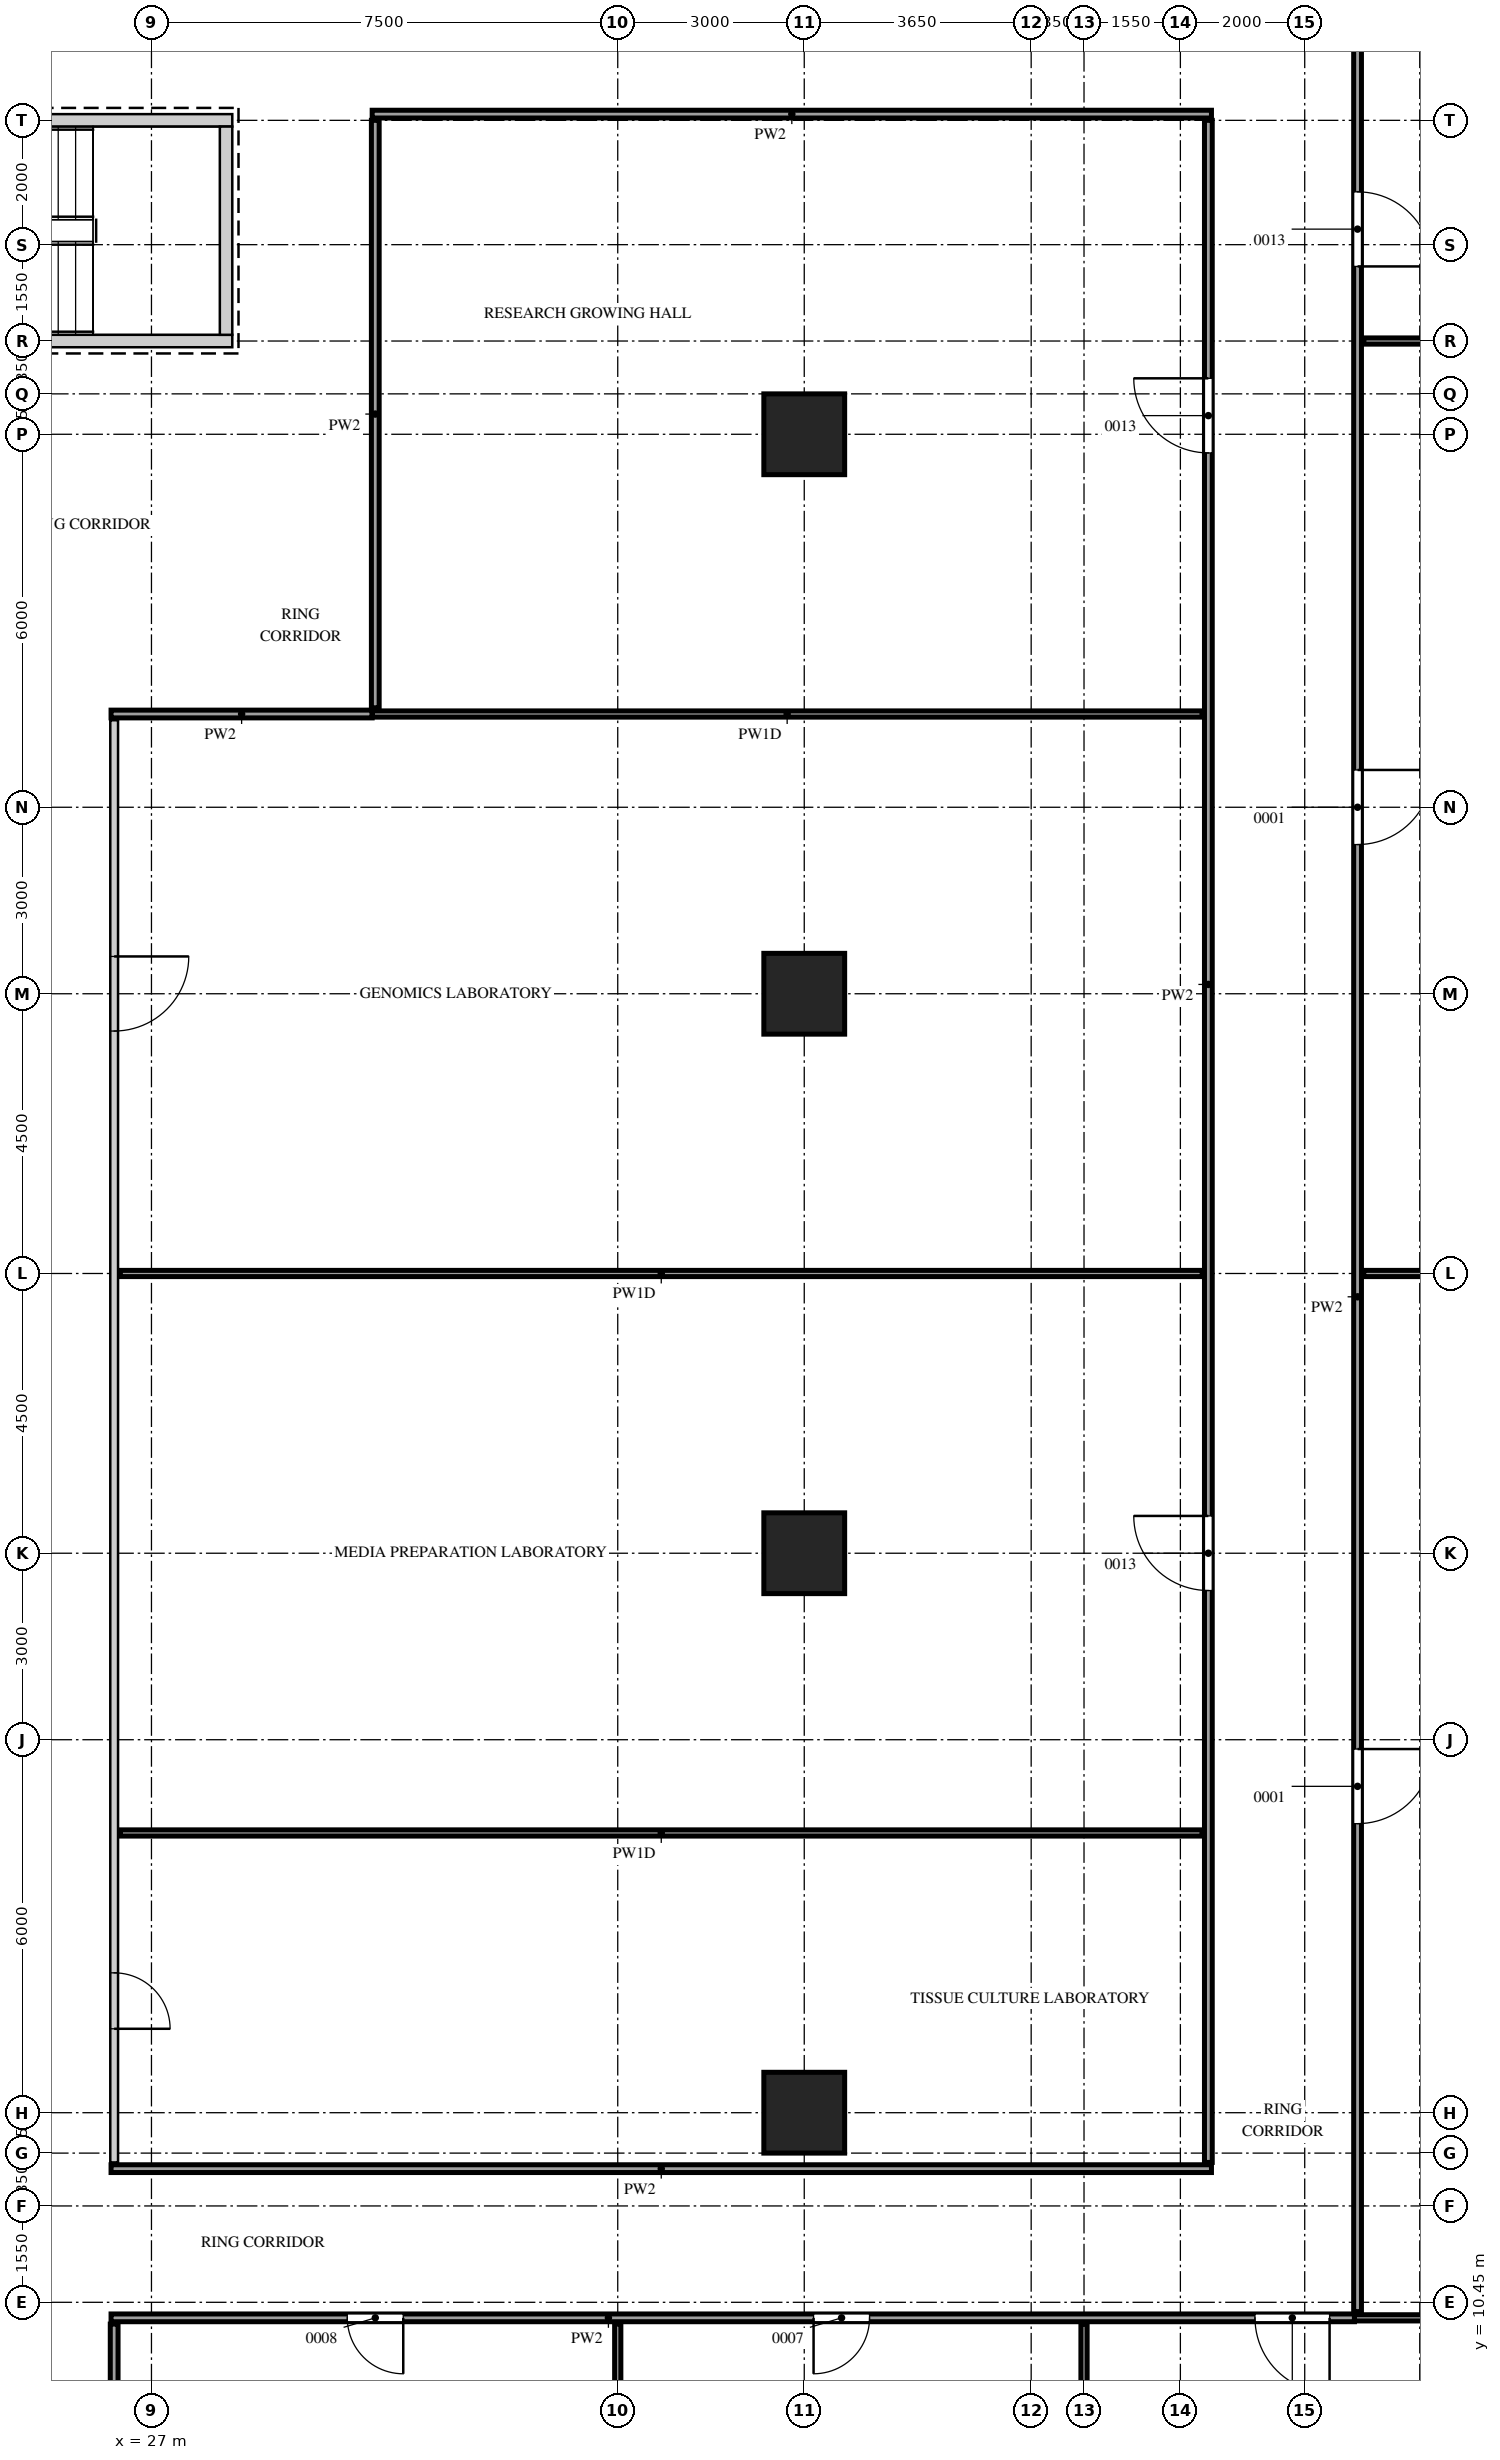
"""IFC4 building model, lengths in metres.
Left out: names, types, materials, properties, quantities, classifications, styles, units other than length and angle.
Written with IfcOpenShell. Run it as: python <this file> out.ifc"""

import sys

from ifc_helpers import new_model, si_unit, direction, frame, frame_2d, origin, origin_2d, place, context, subcontext, project, spatial, rectangle, extrude, source, transform, mapped, element, fill, save


model = new_model("IFC4")
c1 = context("Model", 3, precision=1e-05, world=origin(), true_north=direction((0.0, 1.0)))
c2 = subcontext(c1, "Body", "Model", "MODEL_VIEW")
j1 = project(units=[si_unit("LENGTHUNIT", "METRE"), si_unit("PLANEANGLEUNIT", "RADIAN")], contexts=[c1])
p1 = place(None, origin())
s1 = spatial("IfcSite", under=j1, at=p1, CompositionType="ELEMENT")
p2 = place(p1, origin())
s2 = spatial("IfcBuilding", under=s1, at=p2, CompositionType="ELEMENT")
p3 = place(p2, frame((0.0, 0.0, 101.5)))
s3 = spatial("IfcBuildingStorey", under=s2, at=p3, CompositionType="ELEMENT", Elevation=101.5)
m1 = source(origin(), c2, "Body", "SweptSolid", [
    extrude(rectangle(XDim=7.1, YDim=0.2, at=frame_2d((3.55, 0.0))), origin(), (0.0, 0.0, 1.0), 4.1),
])
p4 = place(p3, frame((21.2, 45.55, 0.0), z_axis=(0.0, 0.0, 1.0), x_axis=(1.0, 0.0, 0.0)))
e1 = element("IfcWall", 1, at=p4, inside=s3, PredefinedType="SHEAR", context=c2, shape_type="MappedRepresentation", body=[
    mapped(m1, transform((0.0, 0.0, 0.0))),
])
m2 = source(origin(), c2, "Body", "SweptSolid", [
    extrude(rectangle(XDim=1.2, YDim=2.1, at=frame_2d((0.6, 1.05))), frame((0.0, 0.11, 0.0), z_axis=(0.0, -1.0, 0.0), x_axis=(1.0, 0.0, 0.0)), (0.0, 0.0, 1.0), 0.22),
])
p5 = place(p4, frame((0.15, 0.0, 0.0)))
e2 = element("IfcOpeningElement", 2, at=p5, cuts=e1, PredefinedType="OPENING", context=c2, shape_type="MappedRepresentation", body=[
    mapped(m2, transform((0.0, 0.0, 0.0))),
])
p6 = place(p3, frame((21.2, 42.0, 0.0), z_axis=(0.0, 0.0, 1.0), x_axis=(1.0, 0.0, 0.0)))
e3 = element("IfcWall", 3, at=p6, inside=s3, PredefinedType="SHEAR", context=c2, shape_type="MappedRepresentation", body=[
    mapped(m1, transform((0.0, 0.0, 0.0))),
])
m3 = source(origin(), c2, "Body", "SweptSolid", [
    extrude(rectangle(XDim=3.35, YDim=0.2, at=frame_2d((1.675, 0.0))), origin(), (0.0, 0.0, 1.0), 4.1),
])
p7 = place(p3, frame((28.2, 42.1, 0.0), z_axis=(0.0, 0.0, 1.0), x_axis=(0.0, 1.0, 0.0)))
e4 = element("IfcWall", 4, at=p7, inside=s3, PredefinedType="SHEAR", context=c2, shape_type="MappedRepresentation", body=[
    mapped(m3, transform((0.0, 0.0, 0.0))),
])
m4 = source(origin(), c2, "Body", "SweptSolid", [
    extrude(rectangle(XDim=1.3, YDim=1.3, at=origin_2d()), origin(), (0.0, 0.0, 1.0), 4.1),
])
for number, where, z_axis, x_axis in (
    (5, (37.5, 13.5, 0.0), (0.0, 0.0, 1.0), (1.0, 0.0, 0.0)),
    (6, (37.5, 22.5, 0.0), (0.0, 0.0, 1.0), (1.0, 0.0, 0.0)),
    (7, (37.5, 31.5, 0.0), (0.0, 0.0, 1.0), (1.0, 0.0, 0.0)),
    (8, (37.5, 40.5, 0.0), (0.0, 0.0, 1.0), (1.0, 0.0, 0.0)),
):
    element("IfcColumn", number, at=place(p3, frame(where, z_axis=z_axis, x_axis=x_axis)), inside=s3, PredefinedType="COLUMN", context=c2, shape_type="MappedRepresentation", body=[
        mapped(m4, transform((0.0, 0.0, 0.0))),
    ])
m5 = source(origin(), c2, "Body", "SweptSolid", [
    extrude(rectangle(XDim=8.45, YDim=0.1, at=frame_2d((4.225, 0.0))), origin(), (0.0, 0.0, 1.0), 3.6),
])
for number, where, z_axis, x_axis in (
    (9, (34.5, 1.65, 0.0), (0.0, 0.0, 1.0), (0.0, 1.0, 0.0)),
    (10, (42.0, 1.65, 0.0), (0.0, 0.0, 1.0), (0.0, 1.0, 0.0)),
):
    element("IfcWall", number, at=place(p3, frame(where, z_axis=z_axis, x_axis=x_axis)), inside=s3, PredefinedType="PARTITIONING", context=c2, shape_type="MappedRepresentation", body=[
        mapped(m5, transform((0.0, 0.0, 0.0))),
    ])
m6 = source(origin(), c2, "Body", "SweptSolid", [
    extrude(rectangle(XDim=3.95, YDim=0.125, at=frame_2d((1.975, 0.0))), origin(), (0.0, 0.0, 1.0), 4.2),
])
p8 = place(p3, frame((26.4, 6.15, 0.0), z_axis=(0.0, 0.0, 1.0), x_axis=(0.0, 1.0, 0.0)))
e11 = element("IfcWall", 11, at=p8, inside=s3, PredefinedType="PARTITIONING", context=c2, shape_type="MappedRepresentation", body=[
    mapped(m6, transform((0.0, 0.0, 0.0))),
])
m7 = source(origin(), c2, "Body", "SweptSolid", [
    extrude(rectangle(XDim=20.0, YDim=0.125, at=frame_2d((10.0, 0.0))), origin(), (0.0, 0.0, 1.0), 4.2),
])
p9 = place(p3, frame((26.35, 10.2, 0.0), z_axis=(0.0, 0.0, 1.0), x_axis=(1.0, 0.0, 0.0)))
e12 = element("IfcWall", 12, at=p9, inside=s3, PredefinedType="PARTITIONING", context=c2, shape_type="MappedRepresentation", body=[
    mapped(m7, transform((0.0, 0.0, 0.0))),
])
m8 = source(origin(), c2, "Body", "SweptSolid", [
    extrude(rectangle(XDim=0.9, YDim=2.1, at=frame_2d((0.45, 1.05))), frame((0.0, 0.073, 0.0), z_axis=(0.0, -1.0, 0.0), x_axis=(1.0, 0.0, 0.0)), (0.0, 0.0, 1.0), 0.145),
])
p10 = place(p9, frame((3.8, 0.0, 0.0)))
e13 = element("IfcOpeningElement", 13, at=p10, cuts=e12, PredefinedType="OPENING", context=c2, shape_type="MappedRepresentation", body=[
    mapped(m8, transform((0.0, 0.0, 0.0))),
])
p11 = place(p9, frame((11.3, 0.0, 0.0)))
e14 = element("IfcOpeningElement", 14, at=p11, cuts=e12, PredefinedType="OPENING", context=c2, shape_type="MappedRepresentation", body=[
    mapped(m8, transform((0.0, 0.0, 0.0))),
])
m9 = source(origin(), c2, "Body", "SweptSolid", [
    extrude(rectangle(XDim=1.2, YDim=2.1, at=frame_2d((0.6, 1.05))), frame((0.0, 0.073, 0.0), z_axis=(0.0, -1.0, 0.0), x_axis=(1.0, 0.0, 0.0)), (0.0, 0.0, 1.0), 0.145),
])
p12 = place(p9, frame((18.4, 0.0, 0.0)))
e15 = element("IfcOpeningElement", 15, at=p12, cuts=e12, PredefinedType="OPENING", context=c2, shape_type="MappedRepresentation", body=[
    mapped(m9, transform((0.0, 0.0, 0.0))),
])
m10 = source(origin(), c2, "Body", "SweptSolid", [
    extrude(rectangle(XDim=6.0, YDim=0.1, at=frame_2d((3.0, 0.0))), origin(), (0.0, 0.0, 1.0), 4.2),
])
p13 = place(p3, frame((46.35, 10.2, 0.0), z_axis=(0.0, 0.0, 1.0), x_axis=(1.0, 0.0, 0.0)))
e16 = element("IfcWall", 16, at=p13, inside=s3, PredefinedType="PARTITIONING", context=c2, shape_type="MappedRepresentation", body=[
    mapped(m10, transform((0.0, 0.0, 0.0))),
])
m11 = source(origin(), c2, "Body", "SweptSolid", [
    extrude(rectangle(XDim=37.65, YDim=0.125, at=frame_2d((18.825, 0.0))), origin(), (0.0, 0.0, 1.0), 4.2),
])
p14 = place(p3, frame((46.4, 10.3, 0.0), z_axis=(0.0, 0.0, 1.0), x_axis=(0.0, 1.0, 0.0)))
e17 = element("IfcWall", 17, at=p14, inside=s3, PredefinedType="PARTITIONING", context=c2, shape_type="MappedRepresentation", body=[
    mapped(m11, transform((0.0, 0.0, 0.0))),
])
p15 = place(p14, frame((7.85, 0.0, 0.0)))
e18 = element("IfcOpeningElement", 18, at=p15, cuts=e17, PredefinedType="OPENING", context=c2, shape_type="MappedRepresentation", body=[
    mapped(m9, transform((0.0, 0.0, 0.0))),
])
p16 = place(p14, frame((23.6, 0.0, 0.0)))
e19 = element("IfcOpeningElement", 19, at=p16, cuts=e17, PredefinedType="OPENING", context=c2, shape_type="MappedRepresentation", body=[
    mapped(m9, transform((0.0, 0.0, 0.0))),
])
p17 = place(p14, frame((32.9, 0.0, 0.0)))
e20 = element("IfcOpeningElement", 20, at=p17, cuts=e17, PredefinedType="OPENING", context=c2, shape_type="MappedRepresentation", body=[
    mapped(m9, transform((0.0, 0.0, 0.0))),
])
m12 = source(origin(), c2, "Body", "SweptSolid", [
    extrude(rectangle(XDim=17.7, YDim=0.125, at=frame_2d((8.85, 0.0))), origin(), (0.0, 0.0, 1.0), 4.2),
])
p18 = place(p3, frame((26.35, 12.6, 0.0), z_axis=(0.0, 0.0, 1.0), x_axis=(1.0, 0.0, 0.0)))
e21 = element("IfcWall", 21, at=p18, inside=s3, PredefinedType="PARTITIONING", context=c2, shape_type="MappedRepresentation", body=[
    mapped(m12, transform((0.0, 0.0, 0.0))),
])
m13 = source(origin(), c2, "Body", "SweptSolid", [
    extrude(rectangle(XDim=23.2, YDim=0.125, at=frame_2d((11.6, 0.0))), origin(), (0.0, 0.0, 1.0), 4.2),
])
p19 = place(p3, frame((26.4, 12.7, 0.0), z_axis=(0.0, 0.0, 1.0), x_axis=(0.0, 1.0, 0.0)))
e22 = element("IfcWall", 22, at=p19, inside=s3, PredefinedType="PARTITIONING", context=c2, shape_type="MappedRepresentation", body=[
    mapped(m13, transform((0.0, 0.0, 0.0))),
])
p20 = place(p19, frame((2.15, 0.0, 0.0)))
e23 = element("IfcOpeningElement", 23, at=p20, cuts=e22, PredefinedType="OPENING", context=c2, shape_type="MappedRepresentation", body=[
    mapped(m8, transform((0.0, 0.0, 0.0))),
])
p21 = place(p19, frame((18.2, 0.0, 0.0)))
e24 = element("IfcOpeningElement", 24, at=p21, cuts=e22, PredefinedType="OPENING", context=c2, shape_type="MappedRepresentation", body=[
    mapped(m9, transform((0.0, 0.0, 0.0))),
])
m14 = source(origin(), c2, "Body", "SweptSolid", [
    extrude(rectangle(XDim=32.85, YDim=0.125, at=frame_2d((16.425, 0.0))), origin(), (0.0, 0.0, 1.0), 4.2),
])
p22 = place(p3, frame((44.0, 12.7, 0.0), z_axis=(0.0, 0.0, 1.0), x_axis=(0.0, 1.0, 0.0)))
e25 = element("IfcWall", 25, at=p22, inside=s3, PredefinedType="PARTITIONING", context=c2, shape_type="MappedRepresentation", body=[
    mapped(m14, transform((0.0, 0.0, 0.0))),
])
p23 = place(p22, frame((9.2, 0.0, 0.0)))
e26 = element("IfcOpeningElement", 26, at=p23, cuts=e25, PredefinedType="OPENING", context=c2, shape_type="MappedRepresentation", body=[
    mapped(m9, transform((0.0, 0.0, 0.0))),
])
p24 = place(p22, frame((27.5, 0.0, 0.0)))
e27 = element("IfcOpeningElement", 27, at=p24, cuts=e25, PredefinedType="OPENING", context=c2, shape_type="MappedRepresentation", body=[
    mapped(m9, transform((0.0, 0.0, 0.0))),
])
m15 = source(origin(), c2, "Body", "SweptSolid", [
    extrude(rectangle(XDim=17.4, YDim=0.1, at=frame_2d((8.7, 0.0))), origin(), (0.0, 0.0, 1.0), 4.2),
])
for number, where, z_axis, x_axis in (
    (28, (26.5, 18.0, 0.0), (0.0, 0.0, 1.0), (1.0, 0.0, 0.0)),
    (29, (26.5, 27.0, 0.0), (0.0, 0.0, 1.0), (1.0, 0.0, 0.0)),
):
    element("IfcWall", number, at=place(p3, frame(where, z_axis=z_axis, x_axis=x_axis)), inside=s3, PredefinedType="PARTITIONING", context=c2, shape_type="MappedRepresentation", body=[
        mapped(m15, transform((0.0, 0.0, 0.0))),
    ])
m16 = source(origin(), c2, "Body", "SweptSolid", [
    extrude(rectangle(XDim=5.85, YDim=0.1, at=frame_2d((2.925, 0.0))), origin(), (0.0, 0.0, 1.0), 4.2),
])
p25 = place(p3, frame((46.5, 27.0, 0.0), z_axis=(0.0, 0.0, 1.0), x_axis=(1.0, 0.0, 0.0)))
e30 = element("IfcWall", 30, at=p25, inside=s3, PredefinedType="PARTITIONING", context=c2, shape_type="MappedRepresentation", body=[
    mapped(m16, transform((0.0, 0.0, 0.0))),
])
m17 = source(origin(), c2, "Body", "SweptSolid", [
    extrude(rectangle(XDim=4.2, YDim=0.125, at=frame_2d((2.1, 0.0))), origin(), (0.0, 0.0, 1.0), 4.2),
])
p26 = place(p3, frame((26.35, 36.0, 0.0), z_axis=(0.0, 0.0, 1.0), x_axis=(1.0, 0.0, 0.0)))
e31 = element("IfcWall", 31, at=p26, inside=s3, PredefinedType="PARTITIONING", context=c2, shape_type="MappedRepresentation", body=[
    mapped(m17, transform((0.0, 0.0, 0.0))),
])
m18 = source(origin(), c2, "Body", "SweptSolid", [
    extrude(rectangle(XDim=13.35, YDim=0.1, at=frame_2d((6.675, 0.0))), origin(), (0.0, 0.0, 1.0), 4.2),
])
p27 = place(p3, frame((30.55, 36.0, 0.0), z_axis=(0.0, 0.0, 1.0), x_axis=(1.0, 0.0, 0.0)))
e32 = element("IfcWall", 32, at=p27, inside=s3, PredefinedType="PARTITIONING", context=c2, shape_type="MappedRepresentation", body=[
    mapped(m18, transform((0.0, 0.0, 0.0))),
])
m19 = source(origin(), c2, "Body", "SweptSolid", [
    extrude(rectangle(XDim=9.45, YDim=0.125, at=frame_2d((4.725, 0.0))), origin(), (0.0, 0.0, 1.0), 4.2),
])
p28 = place(p3, frame((30.6, 36.1, 0.0), z_axis=(0.0, 0.0, 1.0), x_axis=(0.0, 1.0, 0.0)))
e33 = element("IfcWall", 33, at=p28, inside=s3, PredefinedType="PARTITIONING", context=c2, shape_type="MappedRepresentation", body=[
    mapped(m19, transform((0.0, 0.0, 0.0))),
])
p29 = place(p3, frame((46.5, 42.0, 0.0), z_axis=(0.0, 0.0, 1.0), x_axis=(1.0, 0.0, 0.0)))
e34 = element("IfcWall", 34, at=p29, inside=s3, PredefinedType="PARTITIONING", context=c2, shape_type="MappedRepresentation", body=[
    mapped(m16, transform((0.0, 0.0, 0.0))),
])
m20 = source(origin(), c2, "Body", "SweptSolid", [
    extrude(rectangle(XDim=13.5, YDim=0.125, at=frame_2d((6.75, 0.0))), origin(), (0.0, 0.0, 1.0), 4.2),
])
p30 = place(p3, frame((30.55, 45.65, 0.0), z_axis=(0.0, 0.0, 1.0), x_axis=(1.0, 0.0, 0.0)))
e35 = element("IfcWall", 35, at=p30, inside=s3, PredefinedType="PARTITIONING", context=c2, shape_type="MappedRepresentation", body=[
    mapped(m20, transform((0.0, 0.0, 0.0))),
])
m21 = source(origin(), c2, "Body", "SweptSolid", [
    extrude(rectangle(XDim=0.9, YDim=2.1, at=frame_2d((0.45, 1.05))), frame((0.0, 0.025, 0.0), z_axis=(0.0, -1.0, 0.0), x_axis=(1.0, 0.0, 0.0)), (0.0, 0.0, 1.0), 0.05),
])
p31 = place(p10, origin())
e36 = element("IfcDoor", 36, at=p31, inside=s3, OperationType="SINGLE_SWING_RIGHT", PredefinedType="DOOR", context=c2, shape_type="MappedRepresentation", body=[
    mapped(m21, transform((0.0, 0.0, 0.0))),
])
fill(e13, e36)
p32 = place(p11, origin())
e37 = element("IfcDoor", 37, at=p32, inside=s3, OperationType="SINGLE_SWING_LEFT", PredefinedType="DOOR", context=c2, shape_type="MappedRepresentation", body=[
    mapped(m21, transform((0.0, 0.0, 0.0))),
])
fill(e14, e37)
m22 = source(origin(), c2, "Body", "SweptSolid", [
    extrude(rectangle(XDim=1.2, YDim=2.1, at=frame_2d((0.6, 1.05))), frame((0.0, 0.025, 0.0), z_axis=(0.0, -1.0, 0.0), x_axis=(1.0, 0.0, 0.0)), (0.0, 0.0, 1.0), 0.05),
])
p33 = place(p12, origin())
e38 = element("IfcDoor", 38, at=p33, inside=s3, OperationType="SINGLE_SWING_RIGHT", PredefinedType="DOOR", context=c2, shape_type="MappedRepresentation", body=[
    mapped(m22, transform((0.0, 0.0, 0.0))),
])
fill(e15, e38)
p34 = place(p20, origin())
e39 = element("IfcDoor", 39, at=p34, inside=s3, OperationType="SINGLE_SWING_LEFT", PredefinedType="DOOR", context=c2, shape_type="MappedRepresentation", body=[
    mapped(m21, transform((0.0, 0.0, 0.0))),
])
fill(e23, e39)
p35 = place(p23, origin())
e40 = element("IfcDoor", 40, at=p35, inside=s3, OperationType="SINGLE_SWING_LEFT", PredefinedType="DOOR", context=c2, shape_type="MappedRepresentation", body=[
    mapped(m22, transform((0.0, 0.0, 0.0))),
])
fill(e26, e40)
p36 = place(p21, origin())
e41 = element("IfcDoor", 41, at=p36, inside=s3, OperationType="SINGLE_SWING_RIGHT", PredefinedType="DOOR", context=c2, shape_type="MappedRepresentation", body=[
    mapped(m22, transform((0.0, 0.0, 0.0))),
])
fill(e24, e41)
p37 = place(p24, origin())
e42 = element("IfcDoor", 42, at=p37, inside=s3, OperationType="SINGLE_SWING_LEFT", PredefinedType="DOOR", context=c2, shape_type="MappedRepresentation", body=[
    mapped(m22, transform((0.0, 0.0, 0.0))),
])
fill(e27, e42)
p38 = place(p15, origin())
e43 = element("IfcDoor", 43, at=p38, inside=s3, OperationType="SINGLE_SWING_RIGHT", PredefinedType="DOOR", context=c2, shape_type="MappedRepresentation", body=[
    mapped(m22, transform((0.0, 0.0, 0.0))),
])
fill(e18, e43)
p39 = place(p16, origin())
e44 = element("IfcDoor", 44, at=p39, inside=s3, OperationType="SINGLE_SWING_RIGHT", PredefinedType="DOOR", context=c2, shape_type="MappedRepresentation", body=[
    mapped(m22, transform((0.0, 0.0, 0.0))),
])
fill(e19, e44)
p40 = place(p17, origin())
e45 = element("IfcDoor", 45, at=p40, inside=s3, OperationType="SINGLE_SWING_LEFT", PredefinedType="DOOR", context=c2, shape_type="MappedRepresentation", body=[
    mapped(m22, transform((0.0, 0.0, 0.0))),
])
fill(e20, e45)
save(model, sys.argv[1])
